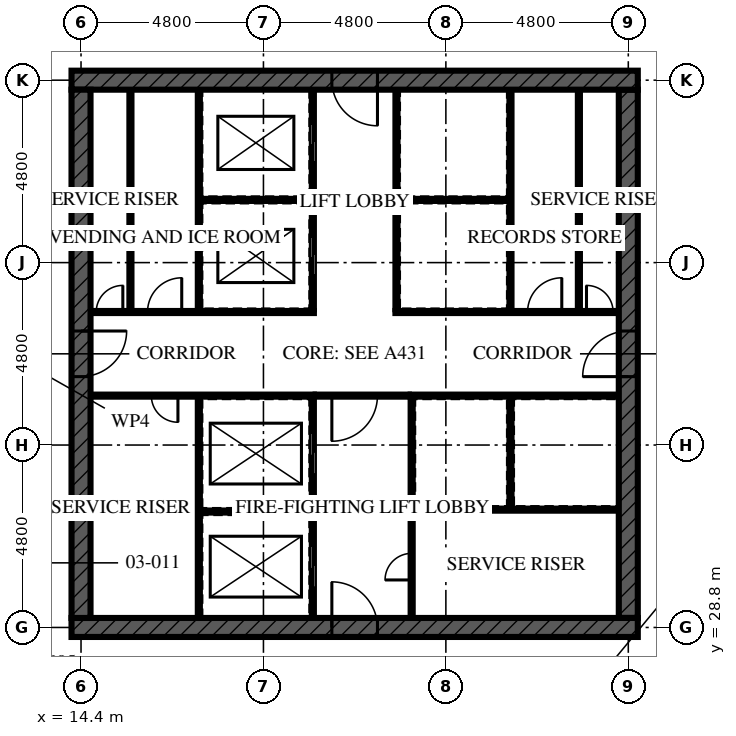
"""IFC4 building model, lengths in metres.
Left out: names, types, materials, properties, quantities, classifications, styles, units other than length and angle.
Written with IfcOpenShell. Run it as: python <this file> out.ifc"""

import sys

from ifc_helpers import new_model, si_unit, direction, frame, frame_2d, origin, place, context, subcontext, project, spatial, rectangle, extrude, element, fill, save


model = new_model("IFC4")
c1 = context("Model", 3, precision=1e-05, world=origin(), true_north=direction((0.0, 1.0)))
c2 = subcontext(c1, "Body", "Model", "MODEL_VIEW")
j1 = project(units=[si_unit("LENGTHUNIT", "METRE"), si_unit("PLANEANGLEUNIT", "RADIAN")], contexts=[c1])
p1 = place(None, origin())
s1 = spatial("IfcSite", under=j1, at=p1, CompositionType="ELEMENT")
p2 = place(p1, origin())
s2 = spatial("IfcBuilding", under=s1, at=p2, CompositionType="ELEMENT")
p3 = place(p2, frame((0.0, 0.0, 13.5)))
s3 = spatial("IfcBuildingStorey", under=s2, at=p3, CompositionType="ELEMENT", Elevation=13.5)
p4 = place(p3, frame((14.15, 28.8, -0.17), z_axis=(0.0, 0.0, 1.0), x_axis=(1.0, 0.0, 0.0)))
e1 = element("IfcWall", 1, at=p4, inside=s3, PredefinedType="SHEAR", context=c2, shape_type="SweptSolid", body=[
    extrude(rectangle(XDim=14.9, YDim=0.5, at=frame_2d((7.45, 0.0))), origin(), (0.0, 0.0, 1.0), 4.5),
])
p5 = place(p4, frame((6.85, 0.0, 0.17)))
e2 = element("IfcOpeningElement", 2, at=p5, cuts=e1, PredefinedType="OPENING", context=c2, shape_type="SweptSolid", body=[
    extrude(rectangle(XDim=1.2, YDim=2.1, at=frame_2d((0.6, 1.05))), frame((0.0, 0.26, 0.0), z_axis=(0.0, -1.0, 0.0), x_axis=(1.0, 0.0, 0.0)), (0.0, 0.0, 1.0), 0.521),
])
p6 = place(p3, frame((29.05, 43.2, -0.17), z_axis=(0.0, 0.0, 1.0), x_axis=(-1.0, 0.0, 0.0)))
e3 = element("IfcWall", 3, at=p6, inside=s3, PredefinedType="SHEAR", context=c2, shape_type="SweptSolid", body=[
    extrude(rectangle(XDim=14.9, YDim=0.5, at=frame_2d((7.45, 0.0))), origin(), (0.0, 0.0, 1.0), 4.5),
])
p7 = place(p6, frame((6.85, 0.0, 0.17)))
e4 = element("IfcOpeningElement", 4, at=p7, cuts=e3, PredefinedType="OPENING", context=c2, shape_type="SweptSolid", body=[
    extrude(rectangle(XDim=1.2, YDim=2.1, at=frame_2d((0.6, 1.05))), frame((0.0, 0.26, 0.0), z_axis=(0.0, -1.0, 0.0), x_axis=(1.0, 0.0, 0.0)), (0.0, 0.0, 1.0), 0.521),
])
p8 = place(p3, frame((14.4, 42.95, -0.17), z_axis=(0.0, 0.0, 1.0), x_axis=(0.0, -1.0, 0.0)))
e5 = element("IfcWall", 5, at=p8, inside=s3, PredefinedType="SHEAR", context=c2, shape_type="SweptSolid", body=[
    extrude(rectangle(XDim=13.9, YDim=0.5, at=frame_2d((6.95, 0.0))), origin(), (0.0, 0.0, 1.0), 4.5),
])
p9 = place(p8, frame((6.35, 0.0, 0.17)))
e6 = element("IfcOpeningElement", 6, at=p9, cuts=e5, PredefinedType="OPENING", context=c2, shape_type="SweptSolid", body=[
    extrude(rectangle(XDim=1.2, YDim=2.1, at=frame_2d((0.6, 1.05))), frame((0.0, 0.26, 0.0), z_axis=(0.0, -1.0, 0.0), x_axis=(1.0, 0.0, 0.0)), (0.0, 0.0, 1.0), 0.521),
])
p10 = place(p3, frame((28.8, 29.05, -0.17), z_axis=(0.0, 0.0, 1.0), x_axis=(0.0, 1.0, 0.0)))
e7 = element("IfcWall", 7, at=p10, inside=s3, PredefinedType="SHEAR", context=c2, shape_type="SweptSolid", body=[
    extrude(rectangle(XDim=13.9, YDim=0.5, at=frame_2d((6.95, 0.0))), origin(), (0.0, 0.0, 1.0), 4.5),
])
p11 = place(p10, frame((6.35, 0.0, 0.17)))
e8 = element("IfcOpeningElement", 8, at=p11, cuts=e7, PredefinedType="OPENING", context=c2, shape_type="SweptSolid", body=[
    extrude(rectangle(XDim=1.2, YDim=2.1, at=frame_2d((0.6, 1.05))), frame((0.0, 0.26, 0.0), z_axis=(0.0, -1.0, 0.0), x_axis=(1.0, 0.0, 0.0)), (0.0, 0.0, 1.0), 0.521),
])
for number, where, z_axis, x_axis in (
    (9, (15.7, 37.15, 0.0), (0.0, 0.0, 1.0), (0.0, 1.0, 0.0)),
    (10, (27.5, 37.15, 0.0), (0.0, 0.0, 1.0), (0.0, 1.0, 0.0)),
):
    element("IfcWall", number, at=place(p3, frame(where, z_axis=z_axis, x_axis=x_axis)), inside=s3, PredefinedType="SOLIDWALL", context=c2, shape_type="SweptSolid", body=[
        extrude(rectangle(XDim=5.8, YDim=0.1, at=frame_2d((2.9, 0.0))), origin(), (0.0, 0.0, 1.0), 4.33),
    ])
p12 = place(p3, frame((20.5, 29.05, 0.0), z_axis=(0.0, 0.0, 1.0), x_axis=(0.0, 1.0, 0.0)))
e11 = element("IfcWall", 11, at=p12, inside=s3, PredefinedType="SOLIDWALL", context=c2, shape_type="SweptSolid", body=[
    extrude(rectangle(XDim=5.8, YDim=0.1, at=frame_2d((2.9, 0.0))), origin(), (0.0, 0.0, 1.0), 4.33),
])
p13 = place(p12, frame((0.8, 0.0, 0.0)))
e12 = element("IfcOpeningElement", 12, at=p13, cuts=e11, PredefinedType="OPENING", context=c2, shape_type="SweptSolid", body=[
    extrude(rectangle(XDim=1.1, YDim=2.3, at=frame_2d((0.55, 1.15))), frame((0.0, 0.061, 0.0), z_axis=(0.0, -1.0, 0.0), x_axis=(1.0, 0.0, 0.0)), (0.0, 0.0, 1.0), 0.121),
])
p14 = place(p12, frame((3.775, 0.0, 0.0)))
e13 = element("IfcOpeningElement", 13, at=p14, cuts=e11, PredefinedType="OPENING", context=c2, shape_type="SweptSolid", body=[
    extrude(rectangle(XDim=1.1, YDim=2.3, at=frame_2d((0.55, 1.15))), frame((0.0, 0.061, 0.0), z_axis=(0.0, -1.0, 0.0), x_axis=(1.0, 0.0, 0.0)), (0.0, 0.0, 1.0), 0.121),
])
p15 = place(p3, frame((20.5, 37.15, 0.0), z_axis=(0.0, 0.0, 1.0), x_axis=(0.0, 1.0, 0.0)))
e14 = element("IfcWall", 14, at=p15, inside=s3, PredefinedType="SOLIDWALL", context=c2, shape_type="SweptSolid", body=[
    extrude(rectangle(XDim=5.8, YDim=0.1, at=frame_2d((2.9, 0.0))), origin(), (0.0, 0.0, 1.0), 4.33),
])
p16 = place(p15, frame((0.925, 0.0, 0.0)))
e15 = element("IfcOpeningElement", 15, at=p16, cuts=e14, PredefinedType="OPENING", context=c2, shape_type="SweptSolid", body=[
    extrude(rectangle(XDim=1.0, YDim=2.1, at=frame_2d((0.5, 1.05))), frame((0.0, 0.061, 0.0), z_axis=(0.0, -1.0, 0.0), x_axis=(1.0, 0.0, 0.0)), (0.0, 0.0, 1.0), 0.121),
])
p17 = place(p15, frame((3.9, 0.0, 0.0)))
e16 = element("IfcOpeningElement", 16, at=p17, cuts=e14, PredefinedType="OPENING", context=c2, shape_type="SweptSolid", body=[
    extrude(rectangle(XDim=1.0, YDim=2.1, at=frame_2d((0.5, 1.05))), frame((0.0, 0.061, 0.0), z_axis=(0.0, -1.0, 0.0), x_axis=(1.0, 0.0, 0.0)), (0.0, 0.0, 1.0), 0.121),
])
p18 = place(p3, frame((22.7, 37.15, 0.0), z_axis=(0.0, 0.0, 1.0), x_axis=(0.0, 1.0, 0.0)))
e17 = element("IfcWall", 17, at=p18, inside=s3, PredefinedType="SOLIDWALL", context=c2, shape_type="SweptSolid", body=[
    extrude(rectangle(XDim=5.8, YDim=0.1, at=frame_2d((2.9, 0.0))), origin(), (0.0, 0.0, 1.0), 4.33),
])
p19 = place(p3, frame((23.1, 29.05, 0.0), z_axis=(0.0, 0.0, 1.0), x_axis=(0.0, 1.0, 0.0)))
e18 = element("IfcWall", 18, at=p19, inside=s3, PredefinedType="SOLIDWALL", context=c2, shape_type="SweptSolid", body=[
    extrude(rectangle(XDim=5.8, YDim=0.1, at=frame_2d((2.9, 0.0))), origin(), (0.0, 0.0, 1.0), 4.33),
])
p20 = place(p19, frame((1.0, 0.0, 0.0)))
e19 = element("IfcOpeningElement", 19, at=p20, cuts=e18, PredefinedType="OPENING", context=c2, shape_type="SweptSolid", body=[
    extrude(rectangle(XDim=0.7, YDim=2.1, at=frame_2d((0.35, 1.05))), frame((0.0, 0.061, 0.0), z_axis=(0.0, -1.0, 0.0), x_axis=(1.0, 0.0, 0.0)), (0.0, 0.0, 1.0), 0.121),
])
p21 = place(p3, frame((14.65, 34.9, 0.0), z_axis=(0.0, 0.0, 1.0), x_axis=(1.0, 0.0, 0.0)))
e20 = element("IfcWall", 20, at=p21, inside=s3, PredefinedType="SOLIDWALL", context=c2, shape_type="SweptSolid", body=[
    extrude(rectangle(XDim=5.9, YDim=0.1, at=frame_2d((2.95, 0.0))), origin(), (0.0, 0.0, 1.0), 4.33),
])
p22 = place(p21, frame((1.6, 0.0, 0.0)))
e21 = element("IfcOpeningElement", 21, at=p22, cuts=e20, PredefinedType="OPENING", context=c2, shape_type="SweptSolid", body=[
    extrude(rectangle(XDim=0.7, YDim=2.1, at=frame_2d((0.35, 1.05))), frame((0.0, 0.061, 0.0), z_axis=(0.0, -1.0, 0.0), x_axis=(1.0, 0.0, 0.0)), (0.0, 0.0, 1.0), 0.121),
])
p23 = place(p3, frame((23.05, 34.9, 0.0), z_axis=(0.0, 0.0, 1.0), x_axis=(1.0, 0.0, 0.0)))
e22 = element("IfcWall", 22, at=p23, inside=s3, PredefinedType="SOLIDWALL", context=c2, shape_type="SweptSolid", body=[
    extrude(rectangle(XDim=5.5, YDim=0.1, at=frame_2d((2.75, 0.0))), origin(), (0.0, 0.0, 1.0), 4.33),
])
p24 = place(p3, frame((14.65, 37.1, 0.0), z_axis=(0.0, 0.0, 1.0), x_axis=(1.0, 0.0, 0.0)))
e23 = element("IfcWall", 23, at=p24, inside=s3, PredefinedType="SOLIDWALL", context=c2, shape_type="SweptSolid", body=[
    extrude(rectangle(XDim=5.9, YDim=0.1, at=frame_2d((2.95, 0.0))), origin(), (0.0, 0.0, 1.0), 4.33),
])
p25 = place(p24, frame((0.15, 0.0, 0.0)))
e24 = element("IfcOpeningElement", 24, at=p25, cuts=e23, PredefinedType="OPENING", context=c2, shape_type="SweptSolid", body=[
    extrude(rectangle(XDim=0.7, YDim=2.1, at=frame_2d((0.35, 1.05))), frame((0.0, 0.061, 0.0), z_axis=(0.0, -1.0, 0.0), x_axis=(1.0, 0.0, 0.0)), (0.0, 0.0, 1.0), 0.121),
])
p26 = place(p24, frame((1.5, 0.0, 0.0)))
e25 = element("IfcOpeningElement", 25, at=p26, cuts=e23, PredefinedType="OPENING", context=c2, shape_type="SweptSolid", body=[
    extrude(rectangle(XDim=0.9, YDim=2.1, at=frame_2d((0.45, 1.05))), frame((0.0, 0.061, 0.0), z_axis=(0.0, -1.0, 0.0), x_axis=(1.0, 0.0, 0.0)), (0.0, 0.0, 1.0), 0.121),
])
p27 = place(p3, frame((22.65, 37.1, 0.0), z_axis=(0.0, 0.0, 1.0), x_axis=(1.0, 0.0, 0.0)))
e26 = element("IfcWall", 26, at=p27, inside=s3, PredefinedType="SOLIDWALL", context=c2, shape_type="SweptSolid", body=[
    extrude(rectangle(XDim=5.9, YDim=0.1, at=frame_2d((2.95, 0.0))), origin(), (0.0, 0.0, 1.0), 4.33),
])
p28 = place(p27, frame((3.5, 0.0, 0.0)))
e27 = element("IfcOpeningElement", 27, at=p28, cuts=e26, PredefinedType="OPENING", context=c2, shape_type="SweptSolid", body=[
    extrude(rectangle(XDim=0.9, YDim=2.1, at=frame_2d((0.45, 1.05))), frame((0.0, 0.061, 0.0), z_axis=(0.0, -1.0, 0.0), x_axis=(1.0, 0.0, 0.0)), (0.0, 0.0, 1.0), 0.121),
])
p29 = place(p27, frame((5.05, 0.0, 0.0)))
e28 = element("IfcOpeningElement", 28, at=p29, cuts=e26, PredefinedType="OPENING", context=c2, shape_type="SweptSolid", body=[
    extrude(rectangle(XDim=0.7, YDim=2.1, at=frame_2d((0.35, 1.05))), frame((0.0, 0.061, 0.0), z_axis=(0.0, -1.0, 0.0), x_axis=(1.0, 0.0, 0.0)), (0.0, 0.0, 1.0), 0.121),
])
p30 = place(p3, frame((20.55, 34.9, 0.0), z_axis=(0.0, 0.0, 1.0), x_axis=(1.0, 0.0, 0.0)))
e29 = element("IfcWall", 29, at=p30, inside=s3, PredefinedType="SOLIDWALL", context=c2, shape_type="SweptSolid", body=[
    extrude(rectangle(XDim=2.5, YDim=0.1, at=frame_2d((1.25, 0.0))), origin(), (0.0, 0.0, 1.0), 4.33),
])
p31 = place(p30, frame((0.45, 0.0, 0.0)))
e30 = element("IfcOpeningElement", 30, at=p31, cuts=e29, PredefinedType="OPENING", context=c2, shape_type="SweptSolid", body=[
    extrude(rectangle(XDim=1.2, YDim=2.1, at=frame_2d((0.6, 1.05))), frame((0.0, 0.061, 0.0), z_axis=(0.0, -1.0, 0.0), x_axis=(1.0, 0.0, 0.0)), (0.0, 0.0, 1.0), 0.121),
])
p32 = place(p3, frame((17.5, 29.05, 0.0), z_axis=(0.0, 0.0, 1.0), x_axis=(0.0, 1.0, 0.0)))
e31 = element("IfcWall", 31, at=p32, inside=s3, PredefinedType="SOLIDWALL", context=c2, shape_type="SweptSolid", body=[
    extrude(rectangle(XDim=5.8, YDim=0.1, at=frame_2d((2.9, 0.0))), origin(), (0.0, 0.0, 1.0), 4.33),
])
p33 = place(p3, frame((17.55, 31.85, 0.0), z_axis=(0.0, 0.0, 1.0), x_axis=(1.0, 0.0, 0.0)))
e32 = element("IfcWall", 32, at=p33, inside=s3, PredefinedType="SOLIDWALL", context=c2, shape_type="SweptSolid", body=[
    extrude(rectangle(XDim=2.9, YDim=0.1, at=frame_2d((1.45, 0.0))), origin(), (0.0, 0.0, 1.0), 4.33),
])
p34 = place(p3, frame((17.5, 37.15, 0.0), z_axis=(0.0, 0.0, 1.0), x_axis=(0.0, 1.0, 0.0)))
e33 = element("IfcWall", 33, at=p34, inside=s3, PredefinedType="SOLIDWALL", context=c2, shape_type="SweptSolid", body=[
    extrude(rectangle(XDim=5.8, YDim=0.1, at=frame_2d((2.9, 0.0))), origin(), (0.0, 0.0, 1.0), 4.33),
])
for number, where, z_axis, x_axis in (
    (34, (17.55, 40.05, 0.0), (0.0, 0.0, 1.0), (1.0, 0.0, 0.0)),
    (35, (22.75, 40.05, 0.0), (0.0, 0.0, 1.0), (1.0, 0.0, 0.0)),
):
    element("IfcWall", number, at=place(p3, frame(where, z_axis=z_axis, x_axis=x_axis)), inside=s3, PredefinedType="SOLIDWALL", context=c2, shape_type="SweptSolid", body=[
        extrude(rectangle(XDim=2.9, YDim=0.1, at=frame_2d((1.45, 0.0))), origin(), (0.0, 0.0, 1.0), 4.33),
    ])
p35 = place(p3, frame((25.7, 37.15, 0.0), z_axis=(0.0, 0.0, 1.0), x_axis=(0.0, 1.0, 0.0)))
e36 = element("IfcWall", 36, at=p35, inside=s3, PredefinedType="SOLIDWALL", context=c2, shape_type="SweptSolid", body=[
    extrude(rectangle(XDim=5.8, YDim=0.1, at=frame_2d((2.9, 0.0))), origin(), (0.0, 0.0, 1.0), 4.33),
])
p36 = place(p3, frame((25.7, 31.95, 0.0), z_axis=(0.0, 0.0, 1.0), x_axis=(0.0, 1.0, 0.0)))
e37 = element("IfcWall", 37, at=p36, inside=s3, PredefinedType="SOLIDWALL", context=c2, shape_type="SweptSolid", body=[
    extrude(rectangle(XDim=2.9, YDim=0.1, at=frame_2d((1.45, 0.0))), origin(), (0.0, 0.0, 1.0), 4.33),
])
p37 = place(p3, frame((23.15, 31.9, 0.0), z_axis=(0.0, 0.0, 1.0), x_axis=(1.0, 0.0, 0.0)))
e38 = element("IfcWall", 38, at=p37, inside=s3, PredefinedType="SOLIDWALL", context=c2, shape_type="SweptSolid", body=[
    extrude(rectangle(XDim=5.4, YDim=0.1, at=frame_2d((2.7, 0.0))), origin(), (0.0, 0.0, 1.0), 4.33),
])
p38 = place(p13, origin())
e39 = element("IfcDoor", 39, at=p38, inside=s3, OperationType="SLIDING_TO_LEFT", PredefinedType="DOOR", context=c2, shape_type="SweptSolid", body=[
    extrude(rectangle(XDim=1.1, YDim=2.3, at=frame_2d((0.55, 1.15))), frame((0.0, 0.05, 0.0), z_axis=(0.0, -1.0, 0.0), x_axis=(1.0, 0.0, 0.0)), (0.0, 0.0, 1.0), 0.1),
])
fill(e12, e39)
p39 = place(p14, origin())
e40 = element("IfcDoor", 40, at=p39, inside=s3, OperationType="SLIDING_TO_LEFT", PredefinedType="DOOR", context=c2, shape_type="SweptSolid", body=[
    extrude(rectangle(XDim=1.1, YDim=2.3, at=frame_2d((0.55, 1.15))), frame((0.0, 0.05, 0.0), z_axis=(0.0, -1.0, 0.0), x_axis=(1.0, 0.0, 0.0)), (0.0, 0.0, 1.0), 0.1),
])
fill(e13, e40)
p40 = place(p16, origin())
e41 = element("IfcDoor", 41, at=p40, inside=s3, OperationType="SLIDING_TO_LEFT", PredefinedType="DOOR", context=c2, shape_type="SweptSolid", body=[
    extrude(rectangle(XDim=1.0, YDim=2.1, at=frame_2d((0.5, 1.05))), frame((0.0, 0.05, 0.0), z_axis=(0.0, -1.0, 0.0), x_axis=(1.0, 0.0, 0.0)), (0.0, 0.0, 1.0), 0.1),
])
fill(e15, e41)
p41 = place(p17, origin())
e42 = element("IfcDoor", 42, at=p41, inside=s3, OperationType="SLIDING_TO_LEFT", PredefinedType="DOOR", context=c2, shape_type="SweptSolid", body=[
    extrude(rectangle(XDim=1.0, YDim=2.1, at=frame_2d((0.5, 1.05))), frame((0.0, 0.05, 0.0), z_axis=(0.0, -1.0, 0.0), x_axis=(1.0, 0.0, 0.0)), (0.0, 0.0, 1.0), 0.1),
])
fill(e16, e42)
p42 = place(p20, origin())
e43 = element("IfcDoor", 43, at=p42, inside=s3, OperationType="SINGLE_SWING_RIGHT", PredefinedType="DOOR", context=c2, shape_type="SweptSolid", body=[
    extrude(rectangle(XDim=0.7, YDim=2.1, at=frame_2d((0.35, 1.05))), frame((0.0, 0.027, 0.0), z_axis=(0.0, -1.0, 0.0), x_axis=(1.0, 0.0, 0.0)), (0.0, 0.0, 1.0), 0.054),
])
fill(e19, e43)
p43 = place(p22, frame((0.7, 0.0, 0.0), z_axis=(0.0, 0.0, 1.0), x_axis=(-1.0, 0.0, 0.0)))
e44 = element("IfcDoor", 44, at=p43, inside=s3, OperationType="SINGLE_SWING_RIGHT", PredefinedType="DOOR", context=c2, shape_type="SweptSolid", body=[
    extrude(rectangle(XDim=0.7, YDim=2.1, at=frame_2d((0.35, 1.05))), frame((0.0, 0.027, 0.0), z_axis=(0.0, -1.0, 0.0), x_axis=(1.0, 0.0, 0.0)), (0.0, 0.0, 1.0), 0.054),
])
fill(e21, e44)
p44 = place(p25, origin())
e45 = element("IfcDoor", 45, at=p44, inside=s3, OperationType="SINGLE_SWING_LEFT", PredefinedType="DOOR", context=c2, shape_type="SweptSolid", body=[
    extrude(rectangle(XDim=0.7, YDim=2.1, at=frame_2d((0.35, 1.05))), frame((0.0, 0.027, 0.0), z_axis=(0.0, -1.0, 0.0), x_axis=(1.0, 0.0, 0.0)), (0.0, 0.0, 1.0), 0.054),
])
fill(e24, e45)
p45 = place(p26, origin())
e46 = element("IfcDoor", 46, at=p45, inside=s3, OperationType="SINGLE_SWING_LEFT", PredefinedType="DOOR", context=c2, shape_type="SweptSolid", body=[
    extrude(rectangle(XDim=0.9, YDim=2.1, at=frame_2d((0.45, 1.05))), frame((0.0, 0.027, 0.0), z_axis=(0.0, -1.0, 0.0), x_axis=(1.0, 0.0, 0.0)), (0.0, 0.0, 1.0), 0.054),
])
fill(e25, e46)
p46 = place(p28, origin())
e47 = element("IfcDoor", 47, at=p46, inside=s3, OperationType="SINGLE_SWING_LEFT", PredefinedType="DOOR", context=c2, shape_type="SweptSolid", body=[
    extrude(rectangle(XDim=0.9, YDim=2.1, at=frame_2d((0.45, 1.05))), frame((0.0, 0.027, 0.0), z_axis=(0.0, -1.0, 0.0), x_axis=(1.0, 0.0, 0.0)), (0.0, 0.0, 1.0), 0.054),
])
fill(e27, e47)
p47 = place(p29, origin())
e48 = element("IfcDoor", 48, at=p47, inside=s3, OperationType="SINGLE_SWING_RIGHT", PredefinedType="DOOR", context=c2, shape_type="SweptSolid", body=[
    extrude(rectangle(XDim=0.7, YDim=2.1, at=frame_2d((0.35, 1.05))), frame((0.0, 0.027, 0.0), z_axis=(0.0, -1.0, 0.0), x_axis=(1.0, 0.0, 0.0)), (0.0, 0.0, 1.0), 0.054),
])
fill(e28, e48)
p48 = place(p31, frame((1.2, 0.0, 0.0), z_axis=(0.0, 0.0, 1.0), x_axis=(-1.0, 0.0, 0.0)))
e49 = element("IfcDoor", 49, at=p48, inside=s3, OperationType="SINGLE_SWING_LEFT", PredefinedType="DOOR", context=c2, shape_type="SweptSolid", body=[
    extrude(rectangle(XDim=1.2, YDim=2.1, at=frame_2d((0.6, 1.05))), frame((0.0, 0.027, 0.0), z_axis=(0.0, -1.0, 0.0), x_axis=(1.0, 0.0, 0.0)), (0.0, 0.0, 1.0), 0.054),
])
fill(e30, e49)
p49 = place(p5, origin())
e50 = element("IfcDoor", 50, at=p49, inside=s3, OperationType="SINGLE_SWING_LEFT", PredefinedType="DOOR", context=c2, shape_type="SweptSolid", body=[
    extrude(rectangle(XDim=1.2, YDim=2.1, at=frame_2d((0.6, 1.05))), frame((0.0, 0.027, 0.0), z_axis=(0.0, -1.0, 0.0), x_axis=(1.0, 0.0, 0.0)), (0.0, 0.0, 1.0), 0.054),
])
fill(e2, e50)
p50 = place(p9, origin())
e51 = element("IfcDoor", 51, at=p50, inside=s3, OperationType="SINGLE_SWING_LEFT", PredefinedType="DOOR", context=c2, shape_type="SweptSolid", body=[
    extrude(rectangle(XDim=1.2, YDim=2.1, at=frame_2d((0.6, 1.05))), frame((0.0, 0.027, 0.0), z_axis=(0.0, -1.0, 0.0), x_axis=(1.0, 0.0, 0.0)), (0.0, 0.0, 1.0), 0.054),
])
fill(e6, e51)
p51 = place(p11, origin())
e52 = element("IfcDoor", 52, at=p51, inside=s3, OperationType="SINGLE_SWING_LEFT", PredefinedType="DOOR", context=c2, shape_type="SweptSolid", body=[
    extrude(rectangle(XDim=1.2, YDim=2.1, at=frame_2d((0.6, 1.05))), frame((0.0, 0.027, 0.0), z_axis=(0.0, -1.0, 0.0), x_axis=(1.0, 0.0, 0.0)), (0.0, 0.0, 1.0), 0.054),
])
fill(e8, e52)
p52 = place(p7, origin())
e53 = element("IfcDoor", 53, at=p52, inside=s3, OperationType="SINGLE_SWING_LEFT", PredefinedType="DOOR", context=c2, shape_type="SweptSolid", body=[
    extrude(rectangle(XDim=1.2, YDim=2.1, at=frame_2d((0.6, 1.05))), frame((0.0, 0.027, 0.0), z_axis=(0.0, -1.0, 0.0), x_axis=(1.0, 0.0, 0.0)), (0.0, 0.0, 1.0), 0.054),
])
fill(e4, e53)
save(model, sys.argv[1])
